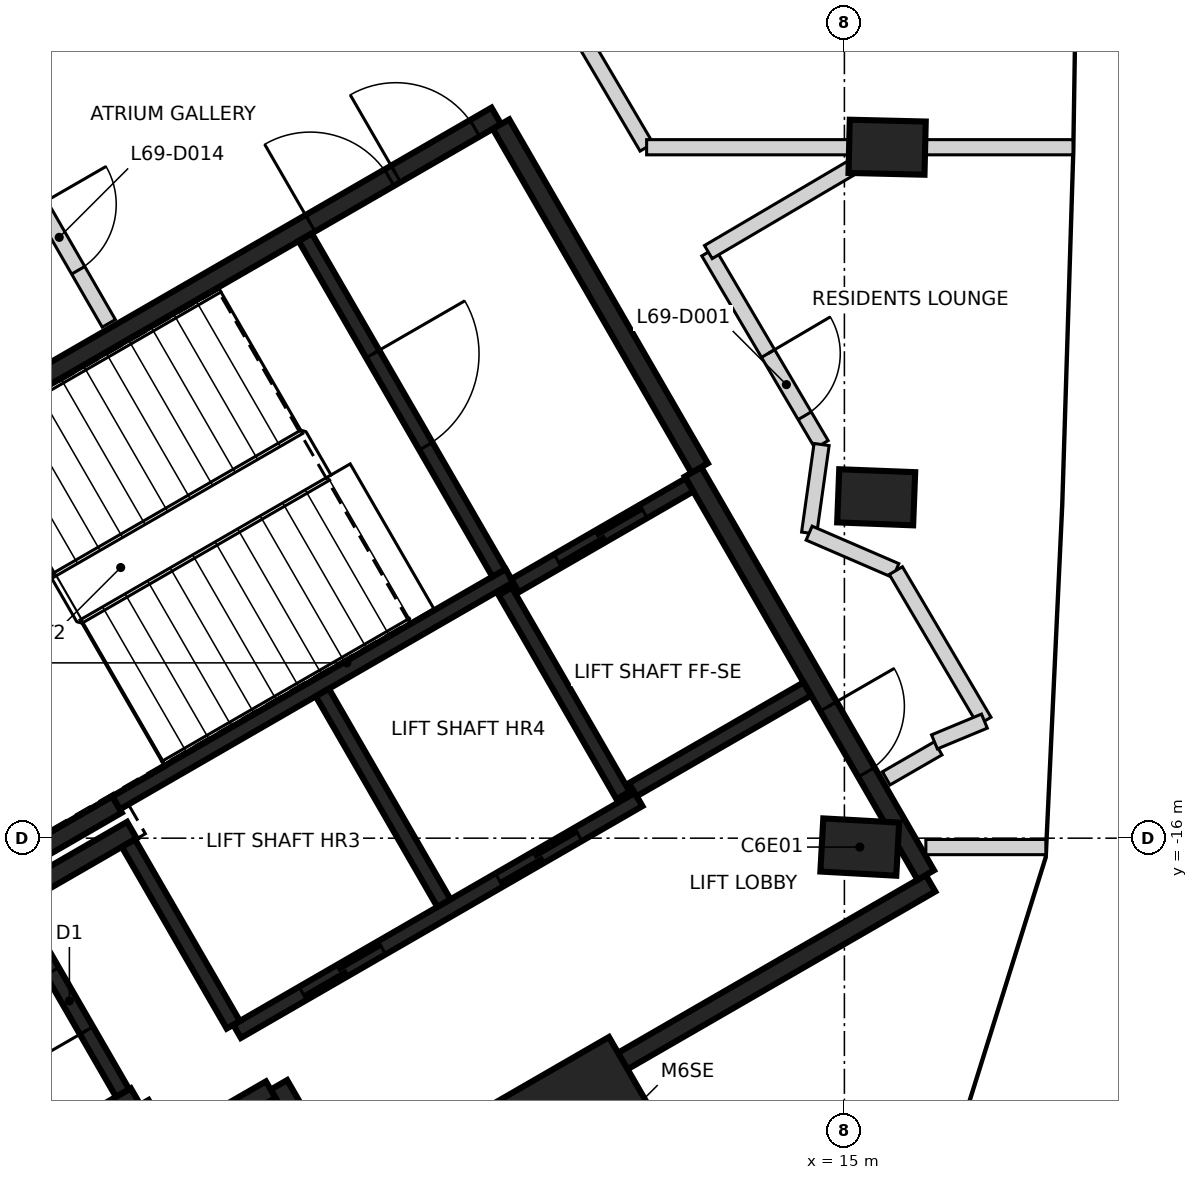
"""IFC4 building model, lengths in metres.
Left out: names, types, materials, properties, quantities, classifications, styles, units other than length and angle.
Written with IfcOpenShell. Run it as: python <this file> out.ifc"""

import sys

from ifc_helpers import new_model, si_unit, direction, frame, frame_2d, origin, origin_2d, place, context, subcontext, project, spatial, rectangle, extrude, element, fill, save


model = new_model("IFC4")
c1 = context("Model", 3, precision=1e-05, world=origin(), true_north=direction((0.0, 1.0)))
c2 = subcontext(c1, "Body", "Model", "MODEL_VIEW")
j1 = project(units=[si_unit("LENGTHUNIT", "METRE"), si_unit("PLANEANGLEUNIT", "RADIAN")], contexts=[c1])
p1 = place(None, origin())
s1 = spatial("IfcSite", under=j1, at=p1, CompositionType="ELEMENT")
p2 = place(p1, origin())
s2 = spatial("IfcBuilding", under=s1, at=p2, CompositionType="ELEMENT")
p3 = place(p2, frame((0.0, 0.0, 273.0)))
s3 = spatial("IfcBuildingStorey", under=s2, at=p3, CompositionType="ELEMENT", Elevation=273.0)
for number, where, z_axis, x_axis in (
    (1, (15.202, -16.117, -0.35), (0.0, 0.0, 1.0), (-0.998, 0.055, 0.0)),
    (2, (15.418, -11.515, -0.35), (0.0, 0.0, 1.0), (-0.999, 0.039, 0.0)),
    (3, (15.562, -6.91, -0.35), (0.0, 0.0, 1.0), (-1.0, 0.024, 0.0)),
):
    element("IfcColumn", number, at=place(p3, frame(where, z_axis=z_axis, x_axis=x_axis)), inside=s3, PredefinedType="COLUMN", context=c2, shape_type="SweptSolid", body=[
        extrude(rectangle(XDim=1.0, YDim=0.7, at=origin_2d()), origin(), (0.0, 0.0, 1.0), 3.6),
    ])
p4 = place(p3, frame((11.637, -20.155, -0.35), z_axis=(0.0, 0.0, 1.0), x_axis=(-0.5, 0.866025403784, 0.0)))
e4 = element("IfcColumn", 4, at=p4, inside=s3, PredefinedType="COLUMN", context=c2, shape_type="SweptSolid", body=[
    extrude(rectangle(XDim=2.4, YDim=2.0, at=origin_2d()), origin(), (0.0, 0.0, 1.0), 3.6),
])
p5 = place(p3, frame((0.417, -12.273, 0.0), z_axis=(0.0, 0.0, 1.0), x_axis=(0.866021906294, 0.500006057782, 0.0)))
e5 = element("IfcWall", 5, at=p5, inside=s3, PredefinedType="SHEAR", context=c2, shape_type="SweptSolid", body=[
    extrude(rectangle(XDim=11.55, YDim=0.25, at=frame_2d((5.775, 0.0))), origin(), (0.0, 0.0, 1.0), 3.25),
])
p6 = place(p5, frame((10.025, 0.0, 0.0)))
e6 = element("IfcOpeningElement", 6, at=p6, cuts=e5, PredefinedType="OPENING", context=c2, shape_type="SweptSolid", body=[
    extrude(rectangle(XDim=1.2, YDim=2.1, at=frame_2d((0.6, 1.05))), frame((0.0, 0.135, 0.0), z_axis=(0.0, -1.0, 0.0), x_axis=(1.0, 0.0, 0.0)), (0.0, 0.0, 1.0), 0.27),
])
p7 = place(p5, frame((8.725, 0.0, 0.0)))
e7 = element("IfcOpeningElement", 7, at=p7, cuts=e5, PredefinedType="OPENING", context=c2, shape_type="SweptSolid", body=[
    extrude(rectangle(XDim=1.2, YDim=2.1, at=frame_2d((0.6, 1.05))), frame((0.0, 0.135, 0.0), z_axis=(0.0, -1.0, 0.0), x_axis=(1.0, 0.0, 0.0)), (0.0, 0.0, 1.0), 0.27),
])
p8 = place(p3, frame((16.133, -16.594, 0.0), z_axis=(0.0, 0.0, 1.0), x_axis=(-0.866022959057, -0.500004234368, 0.0)))
e8 = element("IfcWall", 8, at=p8, inside=s3, PredefinedType="SHEAR", context=c2, shape_type="SweptSolid", body=[
    extrude(rectangle(XDim=8.75, YDim=0.25, at=frame_2d((4.375, 0.0))), origin(), (0.0, 0.0, 1.0), 3.25),
])
p9 = place(p3, frame((13.008, -11.181, 0.0), z_axis=(0.0, 0.0, 1.0), x_axis=(0.500001955336, -0.866024274868, 0.0)))
e9 = element("IfcWall", 9, at=p9, inside=s3, PredefinedType="SHEAR", context=c2, shape_type="SweptSolid", body=[
    extrude(rectangle(XDim=6.125, YDim=0.25, at=frame_2d((3.062, 0.0))), origin(), (0.0, 0.0, 1.0), 3.25),
])
p10 = place(p9, frame((3.563, 0.0, 0.0)))
e10 = element("IfcOpeningElement", 10, at=p10, cuts=e9, PredefinedType="OPENING", context=c2, shape_type="SweptSolid", body=[
    extrude(rectangle(XDim=1.0, YDim=2.1, at=frame_2d((0.5, 1.05))), frame((0.0, 0.135, 0.0), z_axis=(0.0, -1.0, 0.0), x_axis=(1.0, 0.0, 0.0)), (0.0, 0.0, 1.0), 0.27),
])
p11 = place(p3, frame((10.483, -6.606, 0.0), z_axis=(0.0, 0.0, 1.0), x_axis=(0.49999885962, -0.866026062182, 0.0)))
e11 = element("IfcWall", 11, at=p11, inside=s3, PredefinedType="SHEAR", context=c2, shape_type="SweptSolid", body=[
    extrude(rectangle(XDim=5.225, YDim=0.25, at=frame_2d((2.612, 0.0))), origin(), (0.0, 0.0, 1.0), 3.25),
])
p12 = place(p3, frame((5.675, -19.399, 0.0), z_axis=(0.0, 0.0, 1.0), x_axis=(-0.866026637627, -0.499997862916, 0.0)))
e12 = element("IfcWall", 12, at=p12, inside=s3, PredefinedType="SHEAR", context=c2, shape_type="SweptSolid", body=[
    extrude(rectangle(XDim=2.865, YDim=0.25, at=frame_2d((1.432, 0.0))), origin(), (0.0, 0.0, 1.0), 3.25),
])
p13 = place(p3, frame((5.431, -15.556, 0.0), z_axis=(0.0, 0.0, 1.0), x_axis=(-0.866022940537, -0.500004266446, 0.0)))
e13 = element("IfcWall", 13, at=p13, inside=s3, PredefinedType="SHEAR", context=c2, shape_type="SweptSolid", body=[
    extrude(rectangle(XDim=2.575, YDim=0.25, at=frame_2d((1.287, 0.0))), origin(), (0.0, 0.0, 1.0), 3.25),
])
p14 = place(p3, frame((8.493, -20.86, 0.0), z_axis=(0.0, 0.0, 1.0), x_axis=(-0.500039802285, 0.866002422705, 0.0)))
e14 = element("IfcWall", 14, at=p14, inside=s3, PredefinedType="SHEAR", context=c2, shape_type="SweptSolid", body=[
    extrude(rectangle(XDim=1.865, YDim=0.25, at=frame_2d((0.932, 0.0))), origin(), (0.0, 0.0, 1.0), 3.25),
])
p15 = place(p3, frame((4.145, -16.749, 0.0), z_axis=(0.0, 0.0, 1.0), x_axis=(0.866038183914, 0.499977863513, 0.0)))
e15 = element("IfcWall", 15, at=p15, inside=s3, PredefinedType="SHEAR", context=c2, shape_type="SweptSolid", body=[
    extrude(rectangle(XDim=1.71, YDim=0.25, at=frame_2d((0.855, 0.0))), origin(), (0.0, 0.0, 1.0), 3.25),
])
p16 = place(p3, frame((7.452, -19.308, 0.0), z_axis=(0.0, 0.0, 1.0), x_axis=(-0.866044474677, -0.49996696679, 0.0)))
e16 = element("IfcWall", 16, at=p16, inside=s3, PredefinedType="SHEAR", context=c2, shape_type="SweptSolid", body=[
    extrude(rectangle(XDim=1.584, YDim=0.25, at=frame_2d((0.792, 0.0))), origin(), (0.0, 0.0, 1.0), 3.25),
])
p17 = place(p3, frame((6.017, -19.992, 0.0), z_axis=(0.0, 0.0, 1.0), x_axis=(-0.500364886717, 0.865814633822, 0.0)))
e17 = element("IfcWall", 17, at=p17, inside=s3, PredefinedType="SHEAR", context=c2, shape_type="SweptSolid", body=[
    extrude(rectangle(XDim=0.559, YDim=0.25, at=frame_2d((0.28, 0.0))), origin(), (0.0, 0.0, 1.0), 3.25),
])
p18 = place(p3, frame((5.419, -15.534, 0.0), z_axis=(0.0, 0.0, 1.0), x_axis=(0.866029065029, 0.499993658486, 0.0)))
e18 = element("IfcWall", 18, at=p18, inside=s3, PredefinedType="SHEAR", context=c2, shape_type="SweptSolid", body=[
    extrude(rectangle(XDim=5.974, YDim=0.2, at=frame_2d((2.987, 0.0))), origin(), (0.0, 0.0, 1.0), 3.25),
])
p19 = place(p3, frame((7.01, -18.542, 0.0), z_axis=(0.0, 0.0, 1.0), x_axis=(0.866030299012, 0.499991521122, 0.0)))
e19 = element("IfcWall", 19, at=p19, inside=s3, PredefinedType="SHEAR", context=c2, shape_type="SweptSolid", body=[
    extrude(rectangle(XDim=6.1, YDim=0.2, at=frame_2d((3.05, 0.0))), origin(), (0.0, 0.0, 1.0), 3.25),
])
p20 = place(p19, frame((1.0, 0.0, 0.0)))
e20 = element("IfcOpeningElement", 20, at=p20, cuts=e19, PredefinedType="OPENING", context=c2, shape_type="SweptSolid", body=[
    extrude(rectangle(XDim=1.2, YDim=2.1, at=frame_2d((0.6, 1.05))), frame((0.0, 0.11, 0.0), z_axis=(0.0, -1.0, 0.0), x_axis=(1.0, 0.0, 0.0)), (0.0, 0.0, 1.0), 0.22),
])
p21 = place(p19, frame((3.982, 0.0, 0.0)))
e21 = element("IfcOpeningElement", 21, at=p21, cuts=e19, PredefinedType="OPENING", context=c2, shape_type="SweptSolid", body=[
    extrude(rectangle(XDim=1.2, YDim=2.1, at=frame_2d((0.6, 1.05))), frame((0.0, 0.11, 0.0), z_axis=(0.0, -1.0, 0.0), x_axis=(1.0, 0.0, 0.0)), (0.0, 0.0, 1.0), 0.22),
])
p22 = place(p3, frame((7.906, -8.094, 0.0), z_axis=(0.0, 0.0, 1.0), x_axis=(0.500027839223, -0.866009330205, 0.0)))
e22 = element("IfcWall", 22, at=p22, inside=s3, PredefinedType="SHEAR", context=c2, shape_type="SweptSolid", body=[
    extrude(rectangle(XDim=5.098, YDim=0.2, at=frame_2d((2.549, 0.0))), origin(), (0.0, 0.0, 1.0), 3.25),
])
p23 = place(p22, frame((1.774, 0.0, 0.0)))
e23 = element("IfcOpeningElement", 23, at=p23, cuts=e22, PredefinedType="OPENING", context=c2, shape_type="SweptSolid", body=[
    extrude(rectangle(XDim=1.4, YDim=2.1, at=frame_2d((0.7, 1.05))), frame((0.0, 0.11, 0.0), z_axis=(0.0, -1.0, 0.0), x_axis=(1.0, 0.0, 0.0)), (0.0, 0.0, 1.0), 0.22),
])
p24 = place(p3, frame((8.132, -14.084, 0.0), z_axis=(0.0, 0.0, 1.0), x_axis=(0.499997778408, -0.866026686418, 0.0)))
e24 = element("IfcWall", 24, at=p24, inside=s3, PredefinedType="SHEAR", context=c2, shape_type="SweptSolid", body=[
    extrude(rectangle(XDim=3.198, YDim=0.2, at=frame_2d((1.599, 0.0))), origin(), (0.0, 0.0, 1.0), 3.25),
])
p25 = place(p3, frame((5.503, -19.352, 0.0), z_axis=(0.0, 0.0, 1.0), x_axis=(-0.499986818241, 0.866033014143, 0.0)))
e25 = element("IfcWall", 25, at=p25, inside=s3, PredefinedType="SHEAR", context=c2, shape_type="SweptSolid", body=[
    extrude(rectangle(XDim=2.798, YDim=0.2, at=frame_2d((1.399, 0.0))), origin(), (0.0, 0.0, 1.0), 3.25),
])
p26 = place(p25, frame((0.949, 0.0, 0.0)))
e26 = element("IfcOpeningElement", 26, at=p26, cuts=e25, PredefinedType="OPENING", context=c2, shape_type="SweptSolid", body=[
    extrude(rectangle(XDim=0.9, YDim=2.1, at=frame_2d((0.45, 1.05))), frame((0.0, 0.11, 0.0), z_axis=(0.0, -1.0, 0.0), x_axis=(1.0, 0.0, 0.0)), (0.0, 0.0, 1.0), 0.22),
])
p27 = place(p3, frame((6.96, -18.455, 0.0), z_axis=(0.0, 0.0, 1.0), x_axis=(-0.499926705758, 0.866067716099, 0.0)))
e27 = element("IfcWall", 27, at=p27, inside=s3, PredefinedType="SHEAR", context=c2, shape_type="SweptSolid", body=[
    extrude(rectangle(XDim=2.759, YDim=0.2, at=frame_2d((1.38, 0.0))), origin(), (0.0, 0.0, 1.0), 3.25),
])
p28 = place(p3, frame((12.088, -15.437, 0.0), z_axis=(0.0, 0.0, 1.0), x_axis=(-0.500026960575, 0.86600983753, 0.0)))
e28 = element("IfcWall", 28, at=p28, inside=s3, PredefinedType="SHEAR", context=c2, shape_type="SweptSolid", body=[
    extrude(rectangle(XDim=3.1, YDim=0.2, at=frame_2d((1.55, 0.0))), origin(), (0.0, 0.0, 1.0), 3.25),
])
p29 = place(p3, frame((10.666, -12.678, 0.0), z_axis=(0.0, 0.0, 1.0), x_axis=(0.866018407898, 0.500012117035, 0.0)))
e29 = element("IfcWall", 29, at=p29, inside=s3, PredefinedType="SHEAR", context=c2, shape_type="SweptSolid", body=[
    extrude(rectangle(XDim=2.651, YDim=0.2, at=frame_2d((1.325, 0.0))), origin(), (0.0, 0.0, 1.0), 3.25),
])
p30 = place(p29, frame((0.652, 0.0, 0.0)))
e30 = element("IfcOpeningElement", 30, at=p30, cuts=e29, PredefinedType="OPENING", context=c2, shape_type="SweptSolid", body=[
    extrude(rectangle(XDim=1.3, YDim=2.1, at=frame_2d((0.65, 1.05))), frame((0.0, 0.11, 0.0), z_axis=(0.0, -1.0, 0.0), x_axis=(1.0, 0.0, 0.0)), (0.0, 0.0, 1.0), 0.22),
])
p31 = place(p3, frame((14.512, -14.037, 0.0), z_axis=(0.0, 0.0, 1.0), x_axis=(-0.866018407898, -0.500012117035, 0.0)))
e31 = element("IfcWall", 31, at=p31, inside=s3, PredefinedType="SHEAR", context=c2, shape_type="SweptSolid", body=[
    extrude(rectangle(XDim=2.651, YDim=0.2, at=frame_2d((1.325, 0.0))), origin(), (0.0, 0.0, 1.0), 3.25),
])
p32 = place(p3, frame((3.987, -6.911, 0.0), z_axis=(0.0, 0.0, 1.0), x_axis=(0.499458942258, -0.866337558345, 0.0)))
e32 = element("IfcWall", 32, at=p32, inside=s3, PredefinedType="PARTITIONING", context=c2, shape_type="SweptSolid", body=[
    extrude(rectangle(XDim=2.674, YDim=0.2, at=frame_2d((1.337, 0.0))), origin(), (0.0, 0.0, 1.0), 3.25),
])
p33 = place(p32, frame((0.867, 0.0, 0.0)))
e33 = element("IfcOpeningElement", 33, at=p33, cuts=e32, PredefinedType="OPENING", context=c2, shape_type="SweptSolid", body=[
    extrude(rectangle(XDim=1.0, YDim=2.1, at=frame_2d((0.5, 1.05))), frame((0.0, 0.11, 0.0), z_axis=(0.0, -1.0, 0.0), x_axis=(1.0, 0.0, 0.0)), (0.0, 0.0, 1.0), 0.22),
])
p34 = place(p3, frame((11.571, -5.505, 0.0), z_axis=(0.0, 0.0, 1.0), x_axis=(0.507321116571, -0.86175709146, 0.0)))
e34 = element("IfcWall", 34, at=p34, inside=s3, PredefinedType="PARTITIONING", context=c2, shape_type="SweptSolid", body=[
    extrude(rectangle(XDim=1.63, YDim=0.2, at=frame_2d((0.815, 0.0))), origin(), (0.0, 0.0, 1.0), 3.25),
])
p35 = place(p3, frame((12.398, -6.91, 0.0), z_axis=(0.0, 0.0, 1.0), x_axis=(1.0, 0.0, 0.0)))
e35 = element("IfcWall", 35, at=p35, inside=s3, PredefinedType="PARTITIONING", context=c2, shape_type="SweptSolid", body=[
    extrude(rectangle(XDim=2.762, YDim=0.2, at=frame_2d((1.381, 0.0))), origin(), (0.0, 0.0, 1.0), 3.25),
])
p36 = place(p3, frame((13.21, -8.289, 0.0), z_axis=(0.0, 0.0, 1.0), x_axis=(0.507314348132, -0.861761076041, 0.0)))
e36 = element("IfcWall", 36, at=p36, inside=s3, PredefinedType="PARTITIONING", context=c2, shape_type="SweptSolid", body=[
    extrude(rectangle(XDim=2.937, YDim=0.2, at=frame_2d((1.469, 0.0))), origin(), (0.0, 0.0, 1.0), 3.25),
])
p37 = place(p36, frame((1.549, 0.0, 0.0)))
e37 = element("IfcOpeningElement", 37, at=p37, cuts=e36, PredefinedType="OPENING", context=c2, shape_type="SweptSolid", body=[
    extrude(rectangle(XDim=0.95, YDim=2.1, at=frame_2d((0.475, 1.05))), frame((0.0, 0.11, 0.0), z_axis=(0.0, -1.0, 0.0), x_axis=(1.0, 0.0, 0.0)), (0.0, 0.0, 1.0), 0.22),
])
p38 = place(p3, frame((13.21, -8.289, 0.0), z_axis=(0.0, 0.0, 1.0), x_axis=(0.861654599216, 0.507495174017, 0.0)))
e38 = element("IfcWall", 38, at=p38, inside=s3, PredefinedType="PARTITIONING", context=c2, shape_type="SweptSolid", body=[
    extrude(rectangle(XDim=2.38, YDim=0.2, at=frame_2d((1.19, 0.0))), origin(), (0.0, 0.0, 1.0), 3.25),
])
p39 = place(p3, frame((14.536, -11.987, 0.0), z_axis=(0.0, 0.0, 1.0), x_axis=(0.139331074948, 0.990245854096, 0.0)))
e39 = element("IfcWall", 39, at=p39, inside=s3, PredefinedType="PARTITIONING", context=c2, shape_type="SweptSolid", body=[
    extrude(rectangle(XDim=1.177, YDim=0.2, at=frame_2d((0.589, 0.0))), origin(), (0.0, 0.0, 1.0), 3.25),
])
p40 = place(p3, frame((14.536, -11.987, 0.0), z_axis=(0.0, 0.0, 1.0), x_axis=(0.918013607861, -0.396548881958, 0.0)))
e40 = element("IfcWall", 40, at=p40, inside=s3, PredefinedType="PARTITIONING", context=c2, shape_type="SweptSolid", body=[
    extrude(rectangle(XDim=1.243, YDim=0.2, at=frame_2d((0.622, 0.0))), origin(), (0.0, 0.0, 1.0), 2.35),
])
p41 = place(p3, frame((15.55, -15.213, 0.0), z_axis=(0.0, 0.0, 1.0), x_axis=(0.865989998118, 0.500061319399, 0.0)))
e41 = element("IfcWall", 41, at=p41, inside=s3, PredefinedType="PARTITIONING", context=c2, shape_type="SweptSolid", body=[
    extrude(rectangle(XDim=0.79, YDim=0.2, at=frame_2d((0.395, 0.0))), origin(), (0.0, 0.0, 1.0), 3.25),
])
p42 = place(p3, frame((15.677, -12.48, 0.0), z_axis=(0.0, 0.0, 1.0), x_axis=(0.507256975253, -0.861794848591, 0.0)))
e42 = element("IfcWall", 42, at=p42, inside=s3, PredefinedType="PARTITIONING", context=c2, shape_type="SweptSolid", body=[
    extrude(rectangle(XDim=2.297, YDim=0.2, at=frame_2d((1.148, 0.0))), origin(), (0.0, 0.0, 1.0), 3.25),
])
p43 = place(p3, frame((16.185, -14.733, 0.0), z_axis=(0.0, 0.0, 1.0), x_axis=(0.923472400107, 0.38366486188, 0.0)))
e43 = element("IfcWall", 43, at=p43, inside=s3, PredefinedType="PARTITIONING", context=c2, shape_type="SweptSolid", body=[
    extrude(rectangle(XDim=0.711, YDim=0.2, at=frame_2d((0.356, 0.0))), origin(), (0.0, 0.0, 1.0), 3.25),
])
p44 = place(p3, frame((15.161, -6.91, 0.0), z_axis=(0.0, 0.0, 1.0), x_axis=(1.0, 0.0, 0.0)))
e44 = element("IfcWall", 44, at=p44, inside=s3, PredefinedType="PARTITIONING", context=c2, shape_type="SweptSolid", body=[
    extrude(rectangle(XDim=2.846, YDim=0.2, at=frame_2d((1.423, 0.0))), origin(), (0.0, 0.0, 1.0), 3.25),
])
p45 = place(p3, frame((16.072, -16.117, 0.0), z_axis=(0.0, 0.0, 1.0), x_axis=(1.0, 0.0, 0.0)))
e45 = element("IfcWall", 45, at=p45, inside=s3, PredefinedType="PARTITIONING", context=c2, shape_type="SweptSolid", body=[
    extrude(rectangle(XDim=1.578, YDim=0.2, at=frame_2d((0.789, 0.0))), origin(), (0.0, 0.0, 1.0), 3.25),
])
p46 = place(p30, origin())
e46 = element("IfcDoor", 46, at=p46, inside=s3, OperationType="SLIDING_TO_LEFT", PredefinedType="DOOR", context=c2, shape_type="SweptSolid", body=[
    extrude(rectangle(XDim=1.3, YDim=2.1, at=frame_2d((0.65, 1.05))), frame((0.0, 0.025, 0.0), z_axis=(0.0, -1.0, 0.0), x_axis=(1.0, 0.0, 0.0)), (0.0, 0.0, 1.0), 0.05),
])
fill(e30, e46)
p47 = place(p20, origin())
e47 = element("IfcDoor", 47, at=p47, inside=s3, OperationType="DOUBLE_DOOR_SLIDING", PredefinedType="DOOR", context=c2, shape_type="SweptSolid", body=[
    extrude(rectangle(XDim=1.2, YDim=2.1, at=frame_2d((0.6, 1.05))), frame((0.0, 0.025, 0.0), z_axis=(0.0, -1.0, 0.0), x_axis=(1.0, 0.0, 0.0)), (0.0, 0.0, 1.0), 0.05),
])
fill(e20, e47)
p48 = place(p21, origin())
e48 = element("IfcDoor", 48, at=p48, inside=s3, OperationType="DOUBLE_DOOR_SLIDING", PredefinedType="DOOR", context=c2, shape_type="SweptSolid", body=[
    extrude(rectangle(XDim=1.2, YDim=2.1, at=frame_2d((0.6, 1.05))), frame((0.0, 0.025, 0.0), z_axis=(0.0, -1.0, 0.0), x_axis=(1.0, 0.0, 0.0)), (0.0, 0.0, 1.0), 0.05),
])
fill(e21, e48)
p49 = place(p10, origin())
e49 = element("IfcDoor", 49, at=p49, inside=s3, OperationType="SINGLE_SWING_LEFT", PredefinedType="DOOR", context=c2, shape_type="SweptSolid", body=[
    extrude(rectangle(XDim=1.0, YDim=2.1, at=frame_2d((0.5, 1.05))), frame((0.0, 0.025, 0.0), z_axis=(0.0, -1.0, 0.0), x_axis=(1.0, 0.0, 0.0)), (0.0, 0.0, 1.0), 0.05),
])
fill(e10, e49)
p50 = place(p6, origin())
e50 = element("IfcDoor", 50, at=p50, inside=s3, OperationType="SINGLE_SWING_LEFT", PredefinedType="DOOR", context=c2, shape_type="SweptSolid", body=[
    extrude(rectangle(XDim=1.2, YDim=2.1, at=frame_2d((0.6, 1.05))), frame((0.0, 0.025, 0.0), z_axis=(0.0, -1.0, 0.0), x_axis=(1.0, 0.0, 0.0)), (0.0, 0.0, 1.0), 0.05),
])
fill(e6, e50)
p51 = place(p7, origin())
e51 = element("IfcDoor", 51, at=p51, inside=s3, OperationType="SINGLE_SWING_RIGHT", PredefinedType="DOOR", context=c2, shape_type="SweptSolid", body=[
    extrude(rectangle(XDim=1.2, YDim=2.1, at=frame_2d((0.6, 1.05))), frame((0.0, 0.025, 0.0), z_axis=(0.0, -1.0, 0.0), x_axis=(1.0, 0.0, 0.0)), (0.0, 0.0, 1.0), 0.05),
])
fill(e7, e51)
p52 = place(p23, origin())
e52 = element("IfcDoor", 52, at=p52, inside=s3, OperationType="SINGLE_SWING_LEFT", PredefinedType="DOOR", context=c2, shape_type="SweptSolid", body=[
    extrude(rectangle(XDim=1.4, YDim=2.1, at=frame_2d((0.7, 1.05))), frame((0.0, 0.025, 0.0), z_axis=(0.0, -1.0, 0.0), x_axis=(1.0, 0.0, 0.0)), (0.0, 0.0, 1.0), 0.05),
])
fill(e23, e52)
p53 = place(p26, origin())
e53 = element("IfcDoor", 53, at=p53, inside=s3, OperationType="SINGLE_SWING_RIGHT", PredefinedType="DOOR", context=c2, shape_type="SweptSolid", body=[
    extrude(rectangle(XDim=0.9, YDim=2.1, at=frame_2d((0.45, 1.05))), frame((0.0, 0.025, 0.0), z_axis=(0.0, -1.0, 0.0), x_axis=(1.0, 0.0, 0.0)), (0.0, 0.0, 1.0), 0.05),
])
fill(e26, e53)
p54 = place(p37, origin())
e54 = element("IfcDoor", 54, at=p54, inside=s3, OperationType="SINGLE_SWING_LEFT", PredefinedType="DOOR", context=c2, shape_type="SweptSolid", body=[
    extrude(rectangle(XDim=0.95, YDim=2.1, at=frame_2d((0.475, 1.05))), frame((0.0, 0.025, 0.0), z_axis=(0.0, -1.0, 0.0), x_axis=(1.0, 0.0, 0.0)), (0.0, 0.0, 1.0), 0.05),
])
fill(e37, e54)
p55 = place(p33, frame((1.0, 0.0, 0.0), z_axis=(0.0, 0.0, 1.0), x_axis=(-1.0, 0.0, 0.0)))
e55 = element("IfcDoor", 55, at=p55, inside=s3, OperationType="SINGLE_SWING_LEFT", PredefinedType="DOOR", context=c2, shape_type="SweptSolid", body=[
    extrude(rectangle(XDim=1.0, YDim=2.1, at=frame_2d((0.5, 1.05))), frame((0.0, 0.025, 0.0), z_axis=(0.0, -1.0, 0.0), x_axis=(1.0, 0.0, 0.0)), (0.0, 0.0, 1.0), 0.05),
])
fill(e33, e55)
save(model, sys.argv[1])
